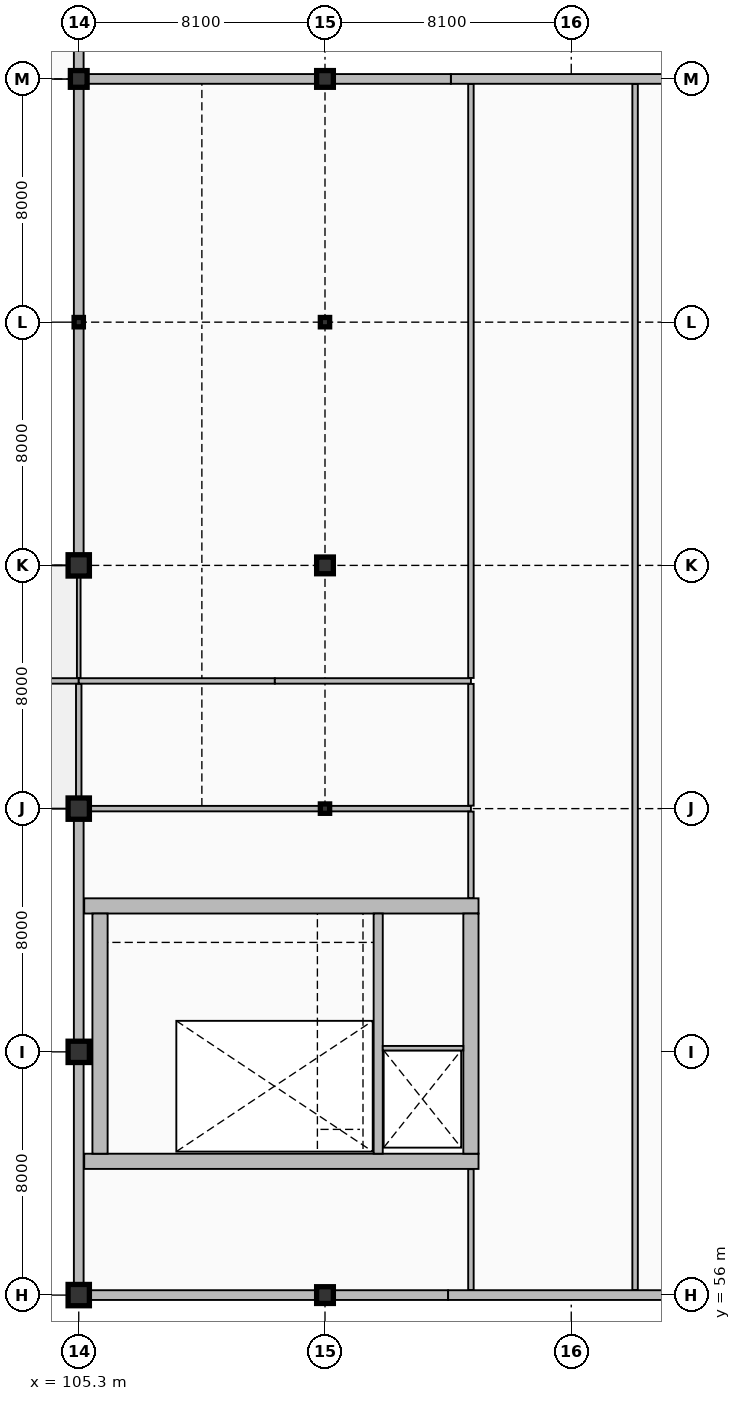
"""IFC4 building model, lengths in metres.
Left out: names, types, materials, properties, quantities, classifications, styles, units other than length and angle.
Written with IfcOpenShell. Run it as: python <this file> out.ifc"""

import sys

from ifc_helpers import new_model, si_unit, direction, frame, frame_2d, origin, origin_2d, place, context, subcontext, project, spatial, rectangle, i_section, extrude, element, fill, save


model = new_model("IFC4")
c1 = context("Model", 3, precision=1e-05, world=origin(), true_north=direction((0.0, 1.0)))
c2 = subcontext(c1, "Body", "Model", "MODEL_VIEW")
j1 = project(units=[si_unit("LENGTHUNIT", "METRE"), si_unit("PLANEANGLEUNIT", "RADIAN")], contexts=[c1])
p1 = place(None, origin())
s1 = spatial("IfcSite", under=j1, at=p1, CompositionType="ELEMENT")
p2 = place(p1, origin())
s2 = spatial("IfcBuilding", under=s1, at=p2, CompositionType="ELEMENT")
p3 = place(p2, frame((0.0, 0.0, 14.7)))
s3 = spatial("IfcBuildingStorey", under=s2, at=p3, CompositionType="ELEMENT", Elevation=14.7)
p4 = place(p3, frame((105.48, 60.4, 0.0), z_axis=(0.0, 0.0, 1.0), x_axis=(1.0, 0.0, 0.0)))
e1 = element("IfcWall", 1, at=p4, inside=s3, PredefinedType="SHEAR", context=c2, shape_type="SweptSolid", body=[
    extrude(rectangle(XDim=12.97, YDim=0.5, at=frame_2d((6.485, 0.0))), origin(), (0.0, 0.0, 1.0), 5.1),
])
p5 = place(p4, frame((1.27, 0.0, 0.0)))
e2 = element("IfcOpeningElement", 2, at=p5, cuts=e1, PredefinedType="OPENING", context=c2, shape_type="SweptSolid", body=[
    extrude(rectangle(XDim=1.15, YDim=2.25, at=frame_2d((0.575, 1.125))), frame((0.0, 0.26, 0.0), z_axis=(0.0, -1.0, 0.0), x_axis=(1.0, 0.0, 0.0)), (0.0, 0.0, 1.0), 0.52),
])
p6 = place(p4, frame((10.475, 0.0, 0.0)))
e3 = element("IfcOpeningElement", 3, at=p6, cuts=e1, PredefinedType="OPENING", context=c2, shape_type="SweptSolid", body=[
    extrude(rectangle(XDim=1.3, YDim=2.3, at=frame_2d((0.65, 1.15))), frame((0.0, 0.26, 0.0), z_axis=(0.0, -1.0, 0.0), x_axis=(1.0, 0.0, 0.0)), (0.0, 0.0, 1.0), 0.52),
])
p7 = place(p3, frame((105.48, 68.8, 0.0), z_axis=(0.0, 0.0, 1.0), x_axis=(1.0, 0.0, 0.0)))
e4 = element("IfcWall", 4, at=p7, inside=s3, PredefinedType="SHEAR", context=c2, shape_type="SweptSolid", body=[
    extrude(rectangle(XDim=12.97, YDim=0.5, at=frame_2d((6.485, 0.0))), origin(), (0.0, 0.0, 1.0), 5.1),
])
for number, where, z_axis, x_axis in (
    (5, (106.0, 60.65, 0.0), (0.0, 0.0, 1.0), (0.0, 1.0, 0.0)),
    (6, (118.2, 60.65, 0.0), (0.0, 0.0, 1.0), (0.0, 1.0, 0.0)),
):
    element("IfcWall", number, at=place(p3, frame(where, z_axis=z_axis, x_axis=x_axis)), inside=s3, PredefinedType="SHEAR", context=c2, shape_type="SweptSolid", body=[
        extrude(rectangle(XDim=7.9, YDim=0.5, at=frame_2d((3.95, 0.0))), origin(), (0.0, 0.0, 1.0), 5.1),
    ])
p8 = place(p3, frame((115.15, 60.65, 0.0), z_axis=(0.0, 0.0, 1.0), x_axis=(0.0, 1.0, 0.0)))
e7 = element("IfcWall", 7, at=p8, inside=s3, PredefinedType="SHEAR", context=c2, shape_type="SweptSolid", body=[
    extrude(rectangle(XDim=7.9, YDim=0.3, at=frame_2d((3.95, 0.0))), origin(), (0.0, 0.0, 1.0), 5.1),
])
for number, where, z_axis, x_axis in (
    (8, (105.3, 56.0, 0.0), (0.0, 0.0, 1.0), (1.0, 0.0, 0.0)),
    (9, (105.3, 64.0, 0.0), (0.0, 0.0, 1.0), (1.0, 0.0, 0.0)),
    (10, (105.3, 72.0, 0.0), (0.0, 0.0, 1.0), (1.0, 0.0, 0.0)),
    (11, (105.3, 80.0, 0.0), (0.0, 0.0, 1.0), (1.0, 0.0, 0.0)),
):
    element("IfcColumn", number, at=place(p3, frame(where, z_axis=z_axis, x_axis=x_axis)), inside=s3, PredefinedType="COLUMN", context=c2, shape_type="SweptSolid", body=[
        extrude(rectangle(XDim=0.7, YDim=0.7, at=origin_2d()), origin(), (0.0, 0.0, 1.0), 5.1),
    ])
p9 = place(p3, frame((105.3, 88.0, 0.0), z_axis=(0.0, 0.0, 1.0), x_axis=(1.0, 0.0, 0.0)))
e12 = element("IfcColumn", 12, at=p9, inside=s3, PredefinedType="COLUMN", context=c2, shape_type="SweptSolid", body=[
    extrude(i_section(OverallWidth=0.305, OverallDepth=0.308, WebThickness=0.01, FlangeThickness=0.015, FilletRadius=0.015, at=origin_2d()), origin(), (0.0, 0.0, 1.0), 5.1),
])
for number, where, z_axis, x_axis in (
    (13, (105.3, 96.0, 0.0), (0.0, 0.0, 1.0), (1.0, 0.0, 0.0)),
    (14, (113.4, 56.0, 0.0), (0.0, 0.0, 1.0), (1.0, 0.0, 0.0)),
):
    element("IfcColumn", number, at=place(p3, frame(where, z_axis=z_axis, x_axis=x_axis)), inside=s3, PredefinedType="COLUMN", context=c2, shape_type="SweptSolid", body=[
        extrude(rectangle(XDim=0.55, YDim=0.55, at=origin_2d()), origin(), (0.0, 0.0, 1.0), 5.1),
    ])
p10 = place(p3, frame((113.4, 72.0, 0.0), z_axis=(0.0, 0.0, 1.0), x_axis=(1.0, 0.0, 0.0)))
e15 = element("IfcColumn", 15, at=p10, inside=s3, PredefinedType="COLUMN", context=c2, shape_type="SweptSolid", body=[
    extrude(i_section(OverallWidth=0.305, OverallDepth=0.308, WebThickness=0.01, FlangeThickness=0.015, FilletRadius=0.015, at=origin_2d()), origin(), (0.0, 0.0, 1.0), 5.1),
])
p11 = place(p3, frame((113.4, 80.0, 0.0), z_axis=(0.0, 0.0, 1.0), x_axis=(1.0, 0.0, 0.0)))
e16 = element("IfcColumn", 16, at=p11, inside=s3, PredefinedType="COLUMN", context=c2, shape_type="SweptSolid", body=[
    extrude(rectangle(XDim=0.55, YDim=0.55, at=origin_2d()), origin(), (0.0, 0.0, 1.0), 5.1),
])
p12 = place(p3, frame((113.4, 88.0, 0.0), z_axis=(0.0, 0.0, 1.0), x_axis=(1.0, 0.0, 0.0)))
e17 = element("IfcColumn", 17, at=p12, inside=s3, PredefinedType="COLUMN", context=c2, shape_type="SweptSolid", body=[
    extrude(i_section(OverallWidth=0.305, OverallDepth=0.308, WebThickness=0.01, FlangeThickness=0.015, FilletRadius=0.015, at=origin_2d()), origin(), (0.0, 0.0, 1.0), 5.1),
])
p13 = place(p3, frame((113.4, 96.0, 0.0), z_axis=(0.0, 0.0, 1.0), x_axis=(1.0, 0.0, 0.0)))
e18 = element("IfcColumn", 18, at=p13, inside=s3, PredefinedType="COLUMN", context=c2, shape_type="SweptSolid", body=[
    extrude(rectangle(XDim=0.55, YDim=0.55, at=origin_2d()), origin(), (0.0, 0.0, 1.0), 5.1),
])
p14 = place(p3, frame((105.3, 71.82, 0.0), z_axis=(0.0, 0.0, 1.0), x_axis=(0.0, -1.0, 0.0)))
e19 = element("IfcWall", 19, at=p14, inside=s3, PredefinedType="SOLIDWALL", context=c2, shape_type="SweptSolid", body=[
    extrude(rectangle(XDim=15.82, YDim=0.32, at=frame_2d((7.91, 0.0))), origin(), (0.0, 0.0, 1.0), 4.332),
])
p15 = place(p3, frame((105.3, 56.0, 0.0), z_axis=(0.0, 0.0, 1.0), x_axis=(1.0, 0.0, 0.0)))
e20 = element("IfcWall", 20, at=p15, inside=s3, PredefinedType="SOLIDWALL", context=c2, shape_type="SweptSolid", body=[
    extrude(rectangle(XDim=12.15, YDim=0.32, at=frame_2d((6.075, 0.0))), origin(), (0.0, 0.0, 1.0), 4.144),
])
p16 = place(p15, frame((5.4, 0.0, 0.95)))
e21 = element("IfcOpeningElement", 21, at=p16, cuts=e20, PredefinedType="OPENING", context=c2, shape_type="SweptSolid", body=[
    extrude(rectangle(XDim=1.2, YDim=1.8, at=frame_2d((0.6, 0.9))), frame((0.0, 0.17, 0.0), z_axis=(0.0, -1.0, 0.0), x_axis=(1.0, 0.0, 0.0)), (0.0, 0.0, 1.0), 0.34),
])
p17 = place(p3, frame((117.45, 56.0, 0.0), z_axis=(0.0, 0.0, 1.0), x_axis=(1.0, 0.0, 0.0)))
e22 = element("IfcWall", 22, at=p17, inside=s3, PredefinedType="SOLIDWALL", context=c2, shape_type="SweptSolid", body=[
    extrude(rectangle(XDim=12.15, YDim=0.32, at=frame_2d((6.075, 0.0))), origin(), (0.0, 0.0, 1.0), 4.144),
])
p18 = place(p17, frame((3.6, 0.0, 0.95)))
e23 = element("IfcOpeningElement", 23, at=p18, cuts=e22, PredefinedType="OPENING", context=c2, shape_type="SweptSolid", body=[
    extrude(rectangle(XDim=1.35, YDim=1.8, at=frame_2d((0.675, 0.9))), frame((0.0, 0.17, 0.0), z_axis=(0.0, -1.0, 0.0), x_axis=(1.0, 0.0, 0.0)), (0.0, 0.0, 1.0), 0.34),
])
p19 = place(p3, frame((129.6, 96.0, 0.0), z_axis=(0.0, 0.0, 1.0), x_axis=(-1.0, 0.0, 0.0)))
e24 = element("IfcWall", 24, at=p19, inside=s3, PredefinedType="SOLIDWALL", context=c2, shape_type="SweptSolid", body=[
    extrude(rectangle(XDim=12.06, YDim=0.32, at=frame_2d((6.03, 0.0))), origin(), (0.0, 0.0, 1.0), 4.144),
])
p20 = place(p19, frame((3.15, 0.0, 0.95)))
e25 = element("IfcOpeningElement", 25, at=p20, cuts=e24, PredefinedType="OPENING", context=c2, shape_type="SweptSolid", body=[
    extrude(rectangle(XDim=1.8, YDim=1.8, at=frame_2d((0.9, 0.9))), frame((0.0, 0.17, 0.0), z_axis=(0.0, -1.0, 0.0), x_axis=(1.0, 0.0, 0.0)), (0.0, 0.0, 1.0), 0.34),
])
p21 = place(p3, frame((117.54, 96.0, 0.0), z_axis=(0.0, 0.0, 1.0), x_axis=(-1.0, 0.0, 0.0)))
e26 = element("IfcWall", 26, at=p21, inside=s3, PredefinedType="SOLIDWALL", context=c2, shape_type="SweptSolid", body=[
    extrude(rectangle(XDim=12.06, YDim=0.32, at=frame_2d((6.03, 0.0))), origin(), (0.0, 0.0, 1.0), 4.144),
])
p22 = place(p21, frame((7.2, 0.0, 0.85)))
e27 = element("IfcOpeningElement", 27, at=p22, cuts=e26, PredefinedType="OPENING", context=c2, shape_type="SweptSolid", body=[
    extrude(rectangle(XDim=1.8, YDim=2.1, at=frame_2d((0.9, 1.05))), frame((0.0, 0.17, 0.0), z_axis=(0.0, -1.0, 0.0), x_axis=(1.0, 0.0, 0.0)), (0.0, 0.0, 1.0), 0.34),
])
p23 = place(p3, frame((105.3, 96.18, 0.0), z_axis=(0.0, 0.0, 1.0), x_axis=(0.0, 1.0, 0.0)))
e28 = element("IfcWall", 28, at=p23, inside=s3, PredefinedType="SOLIDWALL", context=c2, shape_type="SweptSolid", body=[
    extrude(rectangle(XDim=15.82, YDim=0.32, at=frame_2d((7.91, 0.0))), origin(), (0.0, 0.0, 1.0), 4.332),
])
p24 = place(p23, frame((9.45, 0.0, 0.85)))
e29 = element("IfcOpeningElement", 29, at=p24, cuts=e28, PredefinedType="OPENING", context=c2, shape_type="SweptSolid", body=[
    extrude(rectangle(XDim=1.8, YDim=2.4, at=frame_2d((0.9, 1.2))), frame((0.0, 0.17, 0.0), z_axis=(0.0, -1.0, 0.0), x_axis=(1.0, 0.0, 0.0)), (0.0, 0.0, 1.0), 0.34),
])
p25 = place(p3, frame((105.3, 95.82, 0.0), z_axis=(0.0, 0.0, 1.0), x_axis=(0.0, -1.0, 0.0)))
e30 = element("IfcWall", 30, at=p25, inside=s3, PredefinedType="SOLIDWALL", context=c2, shape_type="SweptSolid", body=[
    extrude(rectangle(XDim=15.64, YDim=0.32, at=frame_2d((7.82, 0.0))), origin(), (0.0, 0.0, 1.0), 4.332),
])
p26 = place(p25, frame((4.95, 0.0, 0.85)))
e31 = element("IfcOpeningElement", 31, at=p26, cuts=e30, PredefinedType="OPENING", context=c2, shape_type="SweptSolid", body=[
    extrude(rectangle(XDim=0.75, YDim=2.2, at=frame_2d((0.375, 1.1))), frame((0.0, 0.17, 0.0), z_axis=(0.0, -1.0, 0.0), x_axis=(1.0, 0.0, 0.0)), (0.0, 0.0, 1.0), 0.34),
])
p27 = place(p3, frame((115.3, 64.12, 0.0), z_axis=(0.0, 0.0, 1.0), x_axis=(1.0, 0.0, 0.0)))
e32 = element("IfcWall", 32, at=p27, inside=s3, PredefinedType="PARTITIONING", context=c2, shape_type="SweptSolid", body=[
    extrude(rectangle(XDim=2.65, YDim=0.15, at=frame_2d((1.325, 0.0))), origin(), (0.0, 0.0, 1.0), 4.84),
])
p28 = place(p3, frame((48.6, 76.2, 0.0), z_axis=(0.0, 0.0, 1.0), x_axis=(1.0, 0.0, 0.0)))
e33 = element("IfcWall", 33, at=p28, inside=s3, PredefinedType="PARTITIONING", context=c2, shape_type="SweptSolid", body=[
    extrude(rectangle(XDim=56.7, YDim=0.18, at=frame_2d((28.35, 0.0))), origin(), (0.0, 0.0, 1.0), 4.84),
])
p29 = place(p28, frame((27.8, 0.0, 0.0)))
e34 = element("IfcOpeningElement", 34, at=p29, cuts=e33, PredefinedType="OPENING", context=c2, shape_type="SweptSolid", body=[
    extrude(rectangle(XDim=1.1, YDim=2.2, at=frame_2d((0.55, 1.1))), frame((0.0, 0.1, 0.0), z_axis=(0.0, -1.0, 0.0), x_axis=(1.0, 0.0, 0.0)), (0.0, 0.0, 1.0), 0.2),
])
p30 = place(p3, frame((105.658, 72.0, 0.0), z_axis=(0.0, 0.0, 1.0), x_axis=(1.0, 0.0, 0.0)))
e35 = element("IfcWall", 35, at=p30, inside=s3, PredefinedType="PARTITIONING", context=c2, shape_type="SweptSolid", body=[
    extrude(rectangle(XDim=7.58, YDim=0.18, at=frame_2d((3.79, 0.0))), origin(), (0.0, 0.0, 1.0), 4.232),
])
p31 = place(p3, frame((113.562, 72.0, 0.0), z_axis=(0.0, 0.0, 1.0), x_axis=(1.0, 0.0, 0.0)))
e36 = element("IfcWall", 36, at=p31, inside=s3, PredefinedType="PARTITIONING", context=c2, shape_type="SweptSolid", body=[
    extrude(rectangle(XDim=4.638, YDim=0.18, at=frame_2d((2.319, 0.0))), origin(), (0.0, 0.0, 1.0), 4.144),
])
for number, where, z_axis, x_axis in (
    (37, (105.3, 76.2, 0.0), (0.0, 0.0, 1.0), (1.0, 0.0, 0.0)),
    (38, (111.75, 76.2, 0.0), (0.0, 0.0, 1.0), (1.0, 0.0, 0.0)),
):
    element("IfcWall", number, at=place(p3, frame(where, z_axis=z_axis, x_axis=x_axis)), inside=s3, PredefinedType="PARTITIONING", context=c2, shape_type="SweptSolid", body=[
        extrude(rectangle(XDim=6.45, YDim=0.18, at=frame_2d((3.225, 0.0))), origin(), (0.0, 0.0, 1.0), 4.84),
    ])
p32 = place(p3, frame((105.3, 72.358, 0.0), z_axis=(0.0, 0.0, 1.0), x_axis=(0.0, 1.0, 0.0)))
e39 = element("IfcWall", 39, at=p32, inside=s3, PredefinedType="PARTITIONING", context=c2, shape_type="SweptSolid", body=[
    extrude(rectangle(XDim=3.744, YDim=0.18, at=frame_2d((1.872, 0.0))), origin(), (0.0, 0.0, 1.0), 4.369),
])
p33 = place(p32, frame((1.372, 0.0, 0.0)))
e40 = element("IfcOpeningElement", 40, at=p33, cuts=e39, PredefinedType="OPENING", context=c2, shape_type="SweptSolid", body=[
    extrude(rectangle(XDim=1.6, YDim=2.35, at=frame_2d((0.8, 1.175))), frame((0.0, 0.1, 0.0), z_axis=(0.0, -1.0, 0.0), x_axis=(1.0, 0.0, 0.0)), (0.0, 0.0, 1.0), 0.2),
])
p34 = place(p3, frame((105.3, 76.298, 0.0), z_axis=(0.0, 0.0, 1.0), x_axis=(0.0, 1.0, 0.0)))
e41 = element("IfcWall", 41, at=p34, inside=s3, PredefinedType="PARTITIONING", context=c2, shape_type="SweptSolid", body=[
    extrude(rectangle(XDim=3.344, YDim=0.12, at=frame_2d((1.672, 0.0))), origin(), (0.0, 0.0, 1.0), 4.369),
])
p35 = place(p3, frame((118.2, 56.168, 0.0), z_axis=(0.0, 0.0, 1.0), x_axis=(0.0, 1.0, 0.0)))
e42 = element("IfcWall", 42, at=p35, inside=s3, PredefinedType="PARTITIONING", context=c2, shape_type="SweptSolid", body=[
    extrude(rectangle(XDim=3.974, YDim=0.18, at=frame_2d((1.987, 0.0))), origin(), (0.0, 0.0, 1.0), 4.84),
])
p36 = place(p35, frame((1.387, 0.0, 0.0)))
e43 = element("IfcOpeningElement", 43, at=p36, cuts=e42, PredefinedType="OPENING", context=c2, shape_type="SweptSolid", body=[
    extrude(rectangle(XDim=1.2, YDim=2.2, at=frame_2d((0.6, 1.1))), frame((0.0, 0.1, 0.0), z_axis=(0.0, -1.0, 0.0), x_axis=(1.0, 0.0, 0.0)), (0.0, 0.0, 1.0), 0.2),
])
p37 = place(p3, frame((118.2, 69.058, 0.0), z_axis=(0.0, 0.0, 1.0), x_axis=(0.0, 1.0, 0.0)))
e44 = element("IfcWall", 44, at=p37, inside=s3, PredefinedType="PARTITIONING", context=c2, shape_type="SweptSolid", body=[
    extrude(rectangle(XDim=2.844, YDim=0.18, at=frame_2d((1.422, 0.0))), origin(), (0.0, 0.0, 1.0), 4.84),
])
p38 = place(p37, frame((0.922, 0.0, 0.0)))
e45 = element("IfcOpeningElement", 45, at=p38, cuts=e44, PredefinedType="OPENING", context=c2, shape_type="SweptSolid", body=[
    extrude(rectangle(XDim=1.0, YDim=2.15, at=frame_2d((0.5, 1.075))), frame((0.0, 0.1, 0.0), z_axis=(0.0, -1.0, 0.0), x_axis=(1.0, 0.0, 0.0)), (0.0, 0.0, 1.0), 0.2),
])
p39 = place(p3, frame((118.2, 72.098, 0.0), z_axis=(0.0, 0.0, 1.0), x_axis=(0.0, 1.0, 0.0)))
e46 = element("IfcWall", 46, at=p39, inside=s3, PredefinedType="PARTITIONING", context=c2, shape_type="SweptSolid", body=[
    extrude(rectangle(XDim=4.004, YDim=0.18, at=frame_2d((2.002, 0.0))), origin(), (0.0, 0.0, 1.0), 4.84),
])
p40 = place(p39, frame((1.402, 0.0, 0.0)))
e47 = element("IfcOpeningElement", 47, at=p40, cuts=e46, PredefinedType="OPENING", context=c2, shape_type="SweptSolid", body=[
    extrude(rectangle(XDim=1.2, YDim=2.2, at=frame_2d((0.6, 1.1))), frame((0.0, 0.1, 0.0), z_axis=(0.0, -1.0, 0.0), x_axis=(1.0, 0.0, 0.0)), (0.0, 0.0, 1.0), 0.2),
])
p41 = place(p3, frame((118.2, 76.298, 0.0), z_axis=(0.0, 0.0, 1.0), x_axis=(0.0, 1.0, 0.0)))
e48 = element("IfcWall", 48, at=p41, inside=s3, PredefinedType="PARTITIONING", context=c2, shape_type="SweptSolid", body=[
    extrude(rectangle(XDim=19.534, YDim=0.18, at=frame_2d((9.767, 0.0))), origin(), (0.0, 0.0, 1.0), 4.84),
])
p42 = place(p41, frame((9.267, 0.0, 0.0)))
e49 = element("IfcOpeningElement", 49, at=p42, cuts=e48, PredefinedType="OPENING", context=c2, shape_type="SweptSolid", body=[
    extrude(rectangle(XDim=1.0, YDim=2.2, at=frame_2d((0.5, 1.1))), frame((0.0, 0.1, 0.0), z_axis=(0.0, -1.0, 0.0), x_axis=(1.0, 0.0, 0.0)), (0.0, 0.0, 1.0), 0.2),
])
p43 = place(p3, frame((123.6, 56.168, 0.0), z_axis=(0.0, 0.0, 1.0), x_axis=(0.0, 1.0, 0.0)))
e50 = element("IfcWall", 50, at=p43, inside=s3, PredefinedType="PARTITIONING", context=c2, shape_type="SweptSolid", body=[
    extrude(rectangle(XDim=39.664, YDim=0.18, at=frame_2d((19.832, 0.0))), origin(), (0.0, 0.0, 1.0), 4.84),
])
p44 = place(p43, frame((19.232, 0.0, 0.0)))
e51 = element("IfcOpeningElement", 51, at=p44, cuts=e50, PredefinedType="OPENING", context=c2, shape_type="SweptSolid", body=[
    extrude(rectangle(XDim=1.2, YDim=2.3, at=frame_2d((0.6, 1.15))), frame((0.0, 0.1, 0.0), z_axis=(0.0, -1.0, 0.0), x_axis=(1.0, 0.0, 0.0)), (0.0, 0.0, 1.0), 0.2),
])
p45 = place(p16, origin())
e52 = element("IfcWindow", 52, at=p45, inside=s3, PartitioningType="SINGLE_PANEL", PredefinedType="WINDOW", context=c2, shape_type="SweptSolid", body=[
    extrude(rectangle(XDim=1.2, YDim=1.8, at=frame_2d((0.6, 0.9))), frame((0.0, 0.03, 0.0), z_axis=(0.0, -1.0, 0.0), x_axis=(1.0, 0.0, 0.0)), (0.0, 0.0, 1.0), 0.06),
])
fill(e21, e52)
p46 = place(p18, origin())
e53 = element("IfcWindow", 53, at=p46, inside=s3, PartitioningType="DOUBLE_PANEL_VERTICAL", PredefinedType="WINDOW", context=c2, shape_type="SweptSolid", body=[
    extrude(rectangle(XDim=1.35, YDim=1.8, at=frame_2d((0.675, 0.9))), frame((0.0, 0.03, 0.0), z_axis=(0.0, -1.0, 0.0), x_axis=(1.0, 0.0, 0.0)), (0.0, 0.0, 1.0), 0.06),
])
fill(e23, e53)
p47 = place(p22, origin())
e54 = element("IfcWindow", 54, at=p47, inside=s3, PartitioningType="DOUBLE_PANEL_VERTICAL", PredefinedType="WINDOW", context=c2, shape_type="SweptSolid", body=[
    extrude(rectangle(XDim=1.8, YDim=2.1, at=frame_2d((0.9, 1.05))), frame((0.0, 0.03, 0.0), z_axis=(0.0, -1.0, 0.0), x_axis=(1.0, 0.0, 0.0)), (0.0, 0.0, 1.0), 0.06),
])
fill(e27, e54)
p48 = place(p26, origin())
e55 = element("IfcWindow", 55, at=p48, inside=s3, PartitioningType="SINGLE_PANEL", PredefinedType="WINDOW", context=c2, shape_type="SweptSolid", body=[
    extrude(rectangle(XDim=0.75, YDim=2.2, at=frame_2d((0.375, 1.1))), frame((0.0, 0.03, 0.0), z_axis=(0.0, -1.0, 0.0), x_axis=(1.0, 0.0, 0.0)), (0.0, 0.0, 1.0), 0.06),
])
fill(e31, e55)
p49 = place(p5, origin())
e56 = element("IfcDoor", 56, at=p49, inside=s3, OperationType="SINGLE_SWING_LEFT", PredefinedType="DOOR", context=c2, shape_type="SweptSolid", body=[
    extrude(rectangle(XDim=1.15, YDim=2.25, at=frame_2d((0.575, 1.125))), frame((0.0, 0.025, 0.0), z_axis=(0.0, -1.0, 0.0), x_axis=(1.0, 0.0, 0.0)), (0.0, 0.0, 1.0), 0.05),
])
fill(e2, e56)
p50 = place(p6, frame((1.3, 0.0, 0.0), z_axis=(0.0, 0.0, 1.0), x_axis=(-1.0, 0.0, 0.0)))
e57 = element("IfcDoor", 57, at=p50, inside=s3, OperationType="DOUBLE_DOOR_SLIDING", PredefinedType="DOOR", context=c2, shape_type="SweptSolid", body=[
    extrude(rectangle(XDim=1.3, YDim=2.3, at=frame_2d((0.65, 1.15))), frame((0.0, 0.025, 0.0), z_axis=(0.0, -1.0, 0.0), x_axis=(1.0, 0.0, 0.0)), (0.0, 0.0, 1.0), 0.05),
])
fill(e3, e57)
p51 = place(p33, origin())
e58 = element("IfcDoor", 58, at=p51, inside=s3, OperationType="DOUBLE_DOOR_SINGLE_SWING", PredefinedType="DOOR", context=c2, shape_type="SweptSolid", body=[
    extrude(rectangle(XDim=1.6, YDim=2.35, at=frame_2d((0.8, 1.175))), frame((0.0, 0.025, 0.0), z_axis=(0.0, -1.0, 0.0), x_axis=(1.0, 0.0, 0.0)), (0.0, 0.0, 1.0), 0.05),
])
fill(e40, e58)
p52 = place(p36, frame((1.2, 0.0, 0.0), z_axis=(0.0, 0.0, 1.0), x_axis=(-1.0, 0.0, 0.0)))
e59 = element("IfcDoor", 59, at=p52, inside=s3, OperationType="SINGLE_SWING_RIGHT", PredefinedType="DOOR", context=c2, shape_type="SweptSolid", body=[
    extrude(rectangle(XDim=1.2, YDim=2.2, at=frame_2d((0.6, 1.1))), frame((0.0, 0.025, 0.0), z_axis=(0.0, -1.0, 0.0), x_axis=(1.0, 0.0, 0.0)), (0.0, 0.0, 1.0), 0.05),
])
fill(e43, e59)
p53 = place(p38, origin())
e60 = element("IfcDoor", 60, at=p53, inside=s3, OperationType="SINGLE_SWING_LEFT", PredefinedType="DOOR", context=c2, shape_type="SweptSolid", body=[
    extrude(rectangle(XDim=1.0, YDim=2.15, at=frame_2d((0.5, 1.075))), frame((0.0, 0.025, 0.0), z_axis=(0.0, -1.0, 0.0), x_axis=(1.0, 0.0, 0.0)), (0.0, 0.0, 1.0), 0.05),
])
fill(e45, e60)
p54 = place(p40, origin())
e61 = element("IfcDoor", 61, at=p54, inside=s3, OperationType="SINGLE_SWING_RIGHT", PredefinedType="DOOR", context=c2, shape_type="SweptSolid", body=[
    extrude(rectangle(XDim=1.2, YDim=2.2, at=frame_2d((0.6, 1.1))), frame((0.0, 0.025, 0.0), z_axis=(0.0, -1.0, 0.0), x_axis=(1.0, 0.0, 0.0)), (0.0, 0.0, 1.0), 0.05),
])
fill(e47, e61)
p55 = place(p42, origin())
e62 = element("IfcDoor", 62, at=p55, inside=s3, OperationType="SINGLE_SWING_LEFT", PredefinedType="DOOR", context=c2, shape_type="SweptSolid", body=[
    extrude(rectangle(XDim=1.0, YDim=2.2, at=frame_2d((0.5, 1.1))), frame((0.0, 0.025, 0.0), z_axis=(0.0, -1.0, 0.0), x_axis=(1.0, 0.0, 0.0)), (0.0, 0.0, 1.0), 0.05),
])
fill(e49, e62)
p56 = place(p44, frame((1.2, 0.0, 0.0), z_axis=(0.0, 0.0, 1.0), x_axis=(-1.0, 0.0, 0.0)))
e63 = element("IfcDoor", 63, at=p56, inside=s3, OperationType="SINGLE_SWING_RIGHT", PredefinedType="DOOR", context=c2, shape_type="SweptSolid", body=[
    extrude(rectangle(XDim=1.2, YDim=2.3, at=frame_2d((0.6, 1.15))), frame((0.0, 0.025, 0.0), z_axis=(0.0, -1.0, 0.0), x_axis=(1.0, 0.0, 0.0)), (0.0, 0.0, 1.0), 0.05),
])
fill(e51, e63)
save(model, sys.argv[1])
